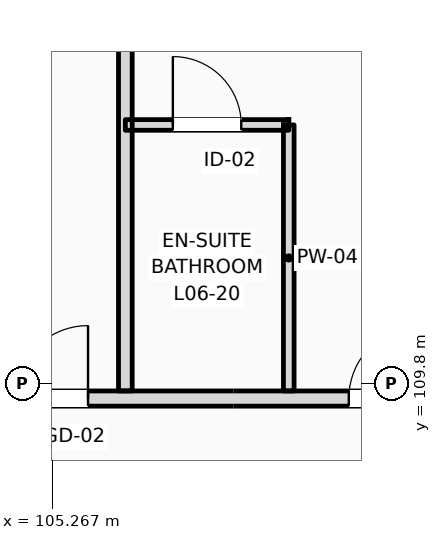
"""IFC4 building model, lengths in metres.
Left out: names, types, materials, properties, quantities, classifications, styles, units other than length and angle.
Written with IfcOpenShell. Run it as: python <this file> out.ifc"""

import sys

from ifc_helpers import new_model, si_unit, direction, frame, frame_2d, origin, place, context, subcontext, project, spatial, rectangle, extrude, element, fill, save


model = new_model("IFC4")
c1 = context("Model", 3, precision=1e-05, world=origin(), true_north=direction((0.0, 1.0)))
c2 = subcontext(c1, "Body", "Model", "MODEL_VIEW")
j1 = project(units=[si_unit("LENGTHUNIT", "METRE"), si_unit("PLANEANGLEUNIT", "RADIAN")], contexts=[c1])
p1 = place(None, origin())
s1 = spatial("IfcSite", under=j1, at=p1, CompositionType="ELEMENT")
p2 = place(p1, origin())
s2 = spatial("IfcBuilding", under=s1, at=p2, CompositionType="ELEMENT")
p3 = place(p2, frame((0.0, 0.0, 28.2)))
s3 = spatial("IfcBuildingStorey", under=s2, at=p3, CompositionType="ELEMENT", Elevation=28.2)
p4 = place(p3, frame((10.65, 109.6, 0.0), z_axis=(0.0, 0.0, 1.0), x_axis=(1.0, 0.0, 0.0)))
e1 = element("IfcWall", 1, at=p4, inside=s3, PredefinedType="PARTITIONING", context=c2, shape_type="SweptSolid", body=[
    extrude(rectangle(XDim=109.21, YDim=0.2, at=frame_2d((54.605, 0.0))), origin(), (0.0, 0.0, 1.0), 2.8),
])
p5 = place(p4, frame((12.611, 0.0, 0.0)))
e2 = element("IfcOpeningElement", 2, at=p5, cuts=e1, PredefinedType="OPENING", context=c2, shape_type="SweptSolid", body=[
    extrude(rectangle(XDim=1.02, YDim=2.2, at=frame_2d((0.51, 1.1))), frame((0.0, 0.11, 0.0), z_axis=(0.0, -1.0, 0.0), x_axis=(1.0, 0.0, 0.0)), (0.0, 0.0, 1.0), 0.22),
])
p6 = place(p4, frame((19.451, 0.0, 0.0)))
e3 = element("IfcOpeningElement", 3, at=p6, cuts=e1, PredefinedType="OPENING", context=c2, shape_type="SweptSolid", body=[
    extrude(rectangle(XDim=1.02, YDim=2.2, at=frame_2d((0.51, 1.1))), frame((0.0, 0.11, 0.0), z_axis=(0.0, -1.0, 0.0), x_axis=(1.0, 0.0, 0.0)), (0.0, 0.0, 1.0), 0.22),
])
p7 = place(p4, frame((23.842, 0.0, 0.0)))
e4 = element("IfcOpeningElement", 4, at=p7, cuts=e1, PredefinedType="OPENING", context=c2, shape_type="SweptSolid", body=[
    extrude(rectangle(XDim=1.02, YDim=2.2, at=frame_2d((0.51, 1.1))), frame((0.0, 0.11, 0.0), z_axis=(0.0, -1.0, 0.0), x_axis=(1.0, 0.0, 0.0)), (0.0, 0.0, 1.0), 0.22),
])
p8 = place(p4, frame((26.084, 0.0, 0.0)))
e5 = element("IfcOpeningElement", 5, at=p8, cuts=e1, PredefinedType="OPENING", context=c2, shape_type="SweptSolid", body=[
    extrude(rectangle(XDim=1.02, YDim=2.2, at=frame_2d((0.51, 1.1))), frame((0.0, 0.11, 0.0), z_axis=(0.0, -1.0, 0.0), x_axis=(1.0, 0.0, 0.0)), (0.0, 0.0, 1.0), 0.22),
])
p9 = place(p4, frame((32.655, 0.0, 0.0)))
e6 = element("IfcOpeningElement", 6, at=p9, cuts=e1, PredefinedType="OPENING", context=c2, shape_type="SweptSolid", body=[
    extrude(rectangle(XDim=0.96, YDim=2.2, at=frame_2d((0.48, 1.1))), frame((0.0, 0.11, 0.0), z_axis=(0.0, -1.0, 0.0), x_axis=(1.0, 0.0, 0.0)), (0.0, 0.0, 1.0), 0.22),
])
p10 = place(p4, frame((34.895, 0.0, 0.0)))
e7 = element("IfcOpeningElement", 7, at=p10, cuts=e1, PredefinedType="OPENING", context=c2, shape_type="SweptSolid", body=[
    extrude(rectangle(XDim=0.96, YDim=2.2, at=frame_2d((0.48, 1.1))), frame((0.0, 0.11, 0.0), z_axis=(0.0, -1.0, 0.0), x_axis=(1.0, 0.0, 0.0)), (0.0, 0.0, 1.0), 0.22),
])
p11 = place(p4, frame((41.436, 0.0, 0.0)))
e8 = element("IfcOpeningElement", 8, at=p11, cuts=e1, PredefinedType="OPENING", context=c2, shape_type="SweptSolid", body=[
    extrude(rectangle(XDim=0.96, YDim=2.2, at=frame_2d((0.48, 1.1))), frame((0.0, 0.11, 0.0), z_axis=(0.0, -1.0, 0.0), x_axis=(1.0, 0.0, 0.0)), (0.0, 0.0, 1.0), 0.22),
])
p12 = place(p4, frame((43.427, 0.0, 0.0)))
e9 = element("IfcOpeningElement", 9, at=p12, cuts=e1, PredefinedType="OPENING", context=c2, shape_type="SweptSolid", body=[
    extrude(rectangle(XDim=0.96, YDim=2.2, at=frame_2d((0.48, 1.1))), frame((0.0, 0.11, 0.0), z_axis=(0.0, -1.0, 0.0), x_axis=(1.0, 0.0, 0.0)), (0.0, 0.0, 1.0), 0.22),
])
p13 = place(p4, frame((50.218, 0.0, 0.0)))
e10 = element("IfcOpeningElement", 10, at=p13, cuts=e1, PredefinedType="OPENING", context=c2, shape_type="SweptSolid", body=[
    extrude(rectangle(XDim=0.96, YDim=2.2, at=frame_2d((0.48, 1.1))), frame((0.0, 0.11, 0.0), z_axis=(0.0, -1.0, 0.0), x_axis=(1.0, 0.0, 0.0)), (0.0, 0.0, 1.0), 0.22),
])
p14 = place(p4, frame((54.859, 0.0, 0.0)))
e11 = element("IfcOpeningElement", 11, at=p14, cuts=e1, PredefinedType="OPENING", context=c2, shape_type="SweptSolid", body=[
    extrude(rectangle(XDim=0.96, YDim=2.2, at=frame_2d((0.48, 1.1))), frame((0.0, 0.11, 0.0), z_axis=(0.0, -1.0, 0.0), x_axis=(1.0, 0.0, 0.0)), (0.0, 0.0, 1.0), 0.22),
])
p15 = place(p4, frame((59.0, 0.0, 0.0)))
e12 = element("IfcOpeningElement", 12, at=p15, cuts=e1, PredefinedType="OPENING", context=c2, shape_type="SweptSolid", body=[
    extrude(rectangle(XDim=0.96, YDim=2.2, at=frame_2d((0.48, 1.1))), frame((0.0, 0.11, 0.0), z_axis=(0.0, -1.0, 0.0), x_axis=(1.0, 0.0, 0.0)), (0.0, 0.0, 1.0), 0.22),
])
p16 = place(p4, frame((63.39, 0.0, 0.0)))
e13 = element("IfcOpeningElement", 13, at=p16, cuts=e1, PredefinedType="OPENING", context=c2, shape_type="SweptSolid", body=[
    extrude(rectangle(XDim=0.96, YDim=2.2, at=frame_2d((0.48, 1.1))), frame((0.0, 0.11, 0.0), z_axis=(0.0, -1.0, 0.0), x_axis=(1.0, 0.0, 0.0)), (0.0, 0.0, 1.0), 0.22),
])
p17 = place(p4, frame((65.631, 0.0, 0.0)))
e14 = element("IfcOpeningElement", 14, at=p17, cuts=e1, PredefinedType="OPENING", context=c2, shape_type="SweptSolid", body=[
    extrude(rectangle(XDim=0.96, YDim=2.2, at=frame_2d((0.48, 1.1))), frame((0.0, 0.11, 0.0), z_axis=(0.0, -1.0, 0.0), x_axis=(1.0, 0.0, 0.0)), (0.0, 0.0, 1.0), 0.22),
])
p18 = place(p4, frame((72.172, 0.0, 0.0)))
e15 = element("IfcOpeningElement", 15, at=p18, cuts=e1, PredefinedType="OPENING", context=c2, shape_type="SweptSolid", body=[
    extrude(rectangle(XDim=0.96, YDim=2.2, at=frame_2d((0.48, 1.1))), frame((0.0, 0.11, 0.0), z_axis=(0.0, -1.0, 0.0), x_axis=(1.0, 0.0, 0.0)), (0.0, 0.0, 1.0), 0.22),
])
p19 = place(p4, frame((74.413, 0.0, 0.0)))
e16 = element("IfcOpeningElement", 16, at=p19, cuts=e1, PredefinedType="OPENING", context=c2, shape_type="SweptSolid", body=[
    extrude(rectangle(XDim=0.96, YDim=2.2, at=frame_2d((0.48, 1.1))), frame((0.0, 0.11, 0.0), z_axis=(0.0, -1.0, 0.0), x_axis=(1.0, 0.0, 0.0)), (0.0, 0.0, 1.0), 0.22),
])
p20 = place(p4, frame((80.954, 0.0, 0.0)))
e17 = element("IfcOpeningElement", 17, at=p20, cuts=e1, PredefinedType="OPENING", context=c2, shape_type="SweptSolid", body=[
    extrude(rectangle(XDim=0.96, YDim=2.2, at=frame_2d((0.48, 1.1))), frame((0.0, 0.11, 0.0), z_axis=(0.0, -1.0, 0.0), x_axis=(1.0, 0.0, 0.0)), (0.0, 0.0, 1.0), 0.22),
])
p21 = place(p4, frame((83.195, 0.0, 0.0)))
e18 = element("IfcOpeningElement", 18, at=p21, cuts=e1, PredefinedType="OPENING", context=c2, shape_type="SweptSolid", body=[
    extrude(rectangle(XDim=0.96, YDim=2.2, at=frame_2d((0.48, 1.1))), frame((0.0, 0.11, 0.0), z_axis=(0.0, -1.0, 0.0), x_axis=(1.0, 0.0, 0.0)), (0.0, 0.0, 1.0), 0.22),
])
p22 = place(p4, frame((89.735, 0.0, 0.0)))
e19 = element("IfcOpeningElement", 19, at=p22, cuts=e1, PredefinedType="OPENING", context=c2, shape_type="SweptSolid", body=[
    extrude(rectangle(XDim=0.96, YDim=2.2, at=frame_2d((0.48, 1.1))), frame((0.0, 0.11, 0.0), z_axis=(0.0, -1.0, 0.0), x_axis=(1.0, 0.0, 0.0)), (0.0, 0.0, 1.0), 0.22),
])
p23 = place(p4, frame((94.126, 0.0, 0.0)))
e20 = element("IfcOpeningElement", 20, at=p23, cuts=e1, PredefinedType="OPENING", context=c2, shape_type="SweptSolid", body=[
    extrude(rectangle(XDim=0.96, YDim=2.2, at=frame_2d((0.48, 1.1))), frame((0.0, 0.11, 0.0), z_axis=(0.0, -1.0, 0.0), x_axis=(1.0, 0.0, 0.0)), (0.0, 0.0, 1.0), 0.22),
])
p24 = place(p4, frame((98.517, 0.0, 0.0)))
e21 = element("IfcOpeningElement", 21, at=p24, cuts=e1, PredefinedType="OPENING", context=c2, shape_type="SweptSolid", body=[
    extrude(rectangle(XDim=0.96, YDim=2.2, at=frame_2d((0.48, 1.1))), frame((0.0, 0.11, 0.0), z_axis=(0.0, -1.0, 0.0), x_axis=(1.0, 0.0, 0.0)), (0.0, 0.0, 1.0), 0.22),
])
p25 = place(p4, frame((102.908, 0.0, 0.0)))
e22 = element("IfcOpeningElement", 22, at=p25, cuts=e1, PredefinedType="OPENING", context=c2, shape_type="SweptSolid", body=[
    extrude(rectangle(XDim=0.96, YDim=2.2, at=frame_2d((0.48, 1.1))), frame((0.0, 0.11, 0.0), z_axis=(0.0, -1.0, 0.0), x_axis=(1.0, 0.0, 0.0)), (0.0, 0.0, 1.0), 0.22),
])
p26 = place(p4, frame((105.099, 0.0, 0.0)))
e23 = element("IfcOpeningElement", 23, at=p26, cuts=e1, PredefinedType="OPENING", context=c2, shape_type="SweptSolid", body=[
    extrude(rectangle(XDim=0.96, YDim=2.2, at=frame_2d((0.48, 1.1))), frame((0.0, 0.11, 0.0), z_axis=(0.0, -1.0, 0.0), x_axis=(1.0, 0.0, 0.0)), (0.0, 0.0, 1.0), 0.22),
])
p27 = place(p4, frame((2.716, 0.0, 0.0)))
e24 = element("IfcOpeningElement", 24, at=p27, cuts=e1, PredefinedType="OPENING", context=c2, shape_type="SweptSolid", body=[
    extrude(rectangle(XDim=1.35, YDim=2.25, at=frame_2d((0.675, 1.125))), frame((0.0, 0.11, 0.0), z_axis=(0.0, -1.0, 0.0), x_axis=(1.0, 0.0, 0.0)), (0.0, 0.0, 1.0), 0.22),
])
p28 = place(p4, frame((6.65, 0.0, 0.0)))
e25 = element("IfcOpeningElement", 25, at=p28, cuts=e1, PredefinedType="OPENING", context=c2, shape_type="SweptSolid", body=[
    extrude(rectangle(XDim=1.35, YDim=2.25, at=frame_2d((0.675, 1.125))), frame((0.0, 0.11, 0.0), z_axis=(0.0, -1.0, 0.0), x_axis=(1.0, 0.0, 0.0)), (0.0, 0.0, 1.0), 0.22),
])
p29 = place(p4, frame((10.583, 0.0, 0.0)))
e26 = element("IfcOpeningElement", 26, at=p29, cuts=e1, PredefinedType="OPENING", context=c2, shape_type="SweptSolid", body=[
    extrude(rectangle(XDim=1.35, YDim=2.25, at=frame_2d((0.675, 1.125))), frame((0.0, 0.11, 0.0), z_axis=(0.0, -1.0, 0.0), x_axis=(1.0, 0.0, 0.0)), (0.0, 0.0, 1.0), 0.22),
])
p30 = place(p3, frame((106.227, 109.7, 0.0), z_axis=(0.0, 0.0, 1.0), x_axis=(0.0, 1.0, 0.0)))
e27 = element("IfcWall", 27, at=p30, inside=s3, PredefinedType="PARTITIONING", context=c2, shape_type="SweptSolid", body=[
    extrude(rectangle(XDim=8.15, YDim=0.18, at=frame_2d((4.075, 0.0))), origin(), (0.0, 0.0, 1.0), 3.05),
])
p31 = place(p3, frame((108.377, 109.7, 0.0), z_axis=(0.0, 0.0, 1.0), x_axis=(0.0, 1.0, 0.0)))
e28 = element("IfcWall", 28, at=p31, inside=s3, PredefinedType="PARTITIONING", context=c2, shape_type="SweptSolid", body=[
    extrude(rectangle(XDim=3.5, YDim=0.14, at=frame_2d((1.75, 0.0))), origin(), (0.0, 0.0, 1.0), 3.36),
])
p32 = place(p3, frame((106.227, 113.2, 0.0), z_axis=(0.0, 0.0, 1.0), x_axis=(1.0, 0.0, 0.0)))
e29 = element("IfcWall", 29, at=p32, inside=s3, PredefinedType="PARTITIONING", context=c2, shape_type="SweptSolid", body=[
    extrude(rectangle(XDim=2.15, YDim=0.14, at=frame_2d((1.075, 0.0))), origin(), (0.0, 0.0, 1.0), 3.36),
])
p33 = place(p32, frame((0.625, 0.0, 0.0)))
e30 = element("IfcOpeningElement", 30, at=p33, cuts=e29, PredefinedType="OPENING", context=c2, shape_type="SweptSolid", body=[
    extrude(rectangle(XDim=0.9, YDim=2.1, at=frame_2d((0.45, 1.05))), frame((0.0, 0.08, 0.0), z_axis=(0.0, -1.0, 0.0), x_axis=(1.0, 0.0, 0.0)), (0.0, 0.0, 1.0), 0.16),
])
p34 = place(p23, origin())
e31 = element("IfcDoor", 31, at=p34, inside=s3, OperationType="SINGLE_SWING_RIGHT", PredefinedType="DOOR", context=c2, shape_type="SweptSolid", body=[
    extrude(rectangle(XDim=0.96, YDim=2.2, at=frame_2d((0.48, 1.1))), frame((0.0, 0.025, 0.0), z_axis=(0.0, -1.0, 0.0), x_axis=(1.0, 0.0, 0.0)), (0.0, 0.0, 1.0), 0.05),
])
fill(e20, e31)
p35 = place(p24, origin())
e32 = element("IfcDoor", 32, at=p35, inside=s3, OperationType="SINGLE_SWING_RIGHT", PredefinedType="DOOR", context=c2, shape_type="SweptSolid", body=[
    extrude(rectangle(XDim=0.96, YDim=2.2, at=frame_2d((0.48, 1.1))), frame((0.0, 0.025, 0.0), z_axis=(0.0, -1.0, 0.0), x_axis=(1.0, 0.0, 0.0)), (0.0, 0.0, 1.0), 0.05),
])
fill(e21, e32)
p36 = place(p33, origin())
e33 = element("IfcDoor", 33, at=p36, inside=s3, OperationType="SINGLE_SWING_LEFT", PredefinedType="DOOR", context=c2, shape_type="SweptSolid", body=[
    extrude(rectangle(XDim=0.9, YDim=2.1, at=frame_2d((0.45, 1.05))), frame((0.0, 0.025, 0.0), z_axis=(0.0, -1.0, 0.0), x_axis=(1.0, 0.0, 0.0)), (0.0, 0.0, 1.0), 0.05),
])
fill(e30, e33)
save(model, sys.argv[1])
